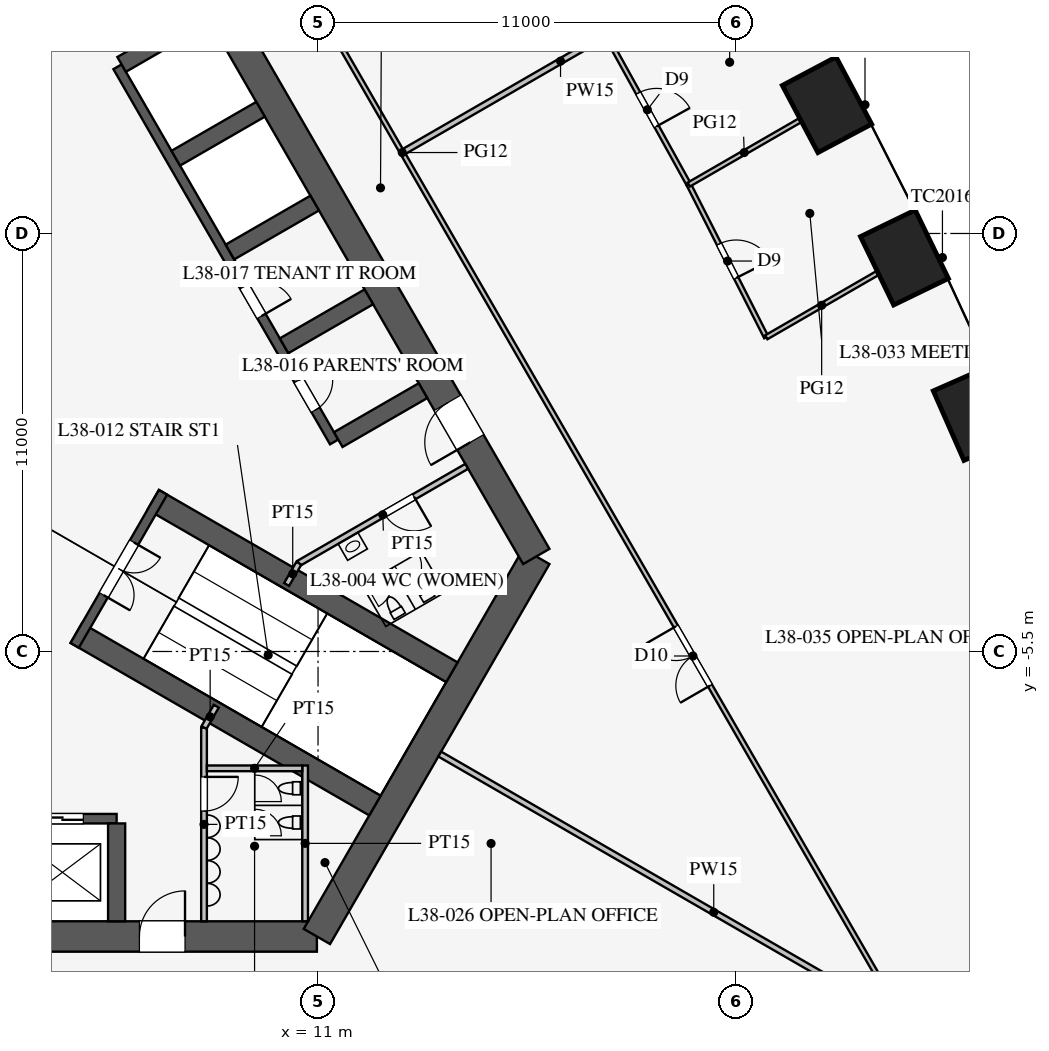
"""IFC4 building model, lengths in metres.
Left out: names, types, materials, properties, quantities, classifications, styles, units other than length and angle.
Written with IfcOpenShell. Run it as: python <this file> out.ifc"""

import sys

from ifc_helpers import new_model, si_unit, direction, frame, frame_2d, origin, origin_2d, place, context, subcontext, project, spatial, rectangle, extrude, element, fill, save


model = new_model("IFC4")
c1 = context("Model", 3, precision=1e-05, world=origin(), true_north=direction((0.0, 1.0)))
c2 = subcontext(c1, "Body", "Model", "MODEL_VIEW")
j1 = project(units=[si_unit("LENGTHUNIT", "METRE"), si_unit("PLANEANGLEUNIT", "RADIAN")], contexts=[c1])
p1 = place(None, origin())
s1 = spatial("IfcSite", under=j1, at=p1, CompositionType="ELEMENT")
p2 = place(p1, origin())
s2 = spatial("IfcBuilding", under=s1, at=p2, CompositionType="ELEMENT")
p3 = place(p2, frame((0.0, 0.0, 166.1)))
s3 = spatial("IfcBuildingStorey", under=s2, at=p3, CompositionType="ELEMENT", Elevation=166.1)
for number, where, z_axis, x_axis in (
    (1, (28.325, 0.765, 0.0), (0.0, 0.0, 1.0), (-0.403, 0.915, 0.0)),
    (2, (26.43, 4.867, 0.0), (0.0, 0.0, 1.0), (-0.436, 0.9, 0.0)),
    (3, (24.393, 8.887, 0.0), (0.0, 0.0, 1.0), (-0.468, 0.883, 0.0)),
):
    element("IfcColumn", number, at=place(p3, frame(where, z_axis=z_axis, x_axis=x_axis)), inside=s3, PredefinedType="COLUMN", context=c2, shape_type="SweptSolid", body=[
        extrude(rectangle(XDim=2.0, YDim=1.6, at=origin_2d()), origin(), (0.0, 0.0, 1.0), 4.2),
    ])
p4 = place(p3, frame((-10.97, -13.0, 0.0), z_axis=(0.0, 0.0, 1.0), x_axis=(1.0, 0.0, 0.0)))
e4 = element("IfcWall", 4, at=p4, inside=s3, PredefinedType="SHEAR", context=c2, shape_type="SweptSolid", body=[
    extrude(rectangle(XDim=21.939, YDim=0.8, at=frame_2d((10.97, 0.0))), origin(), (0.0, 0.0, 1.0), 4.2),
])
p5 = place(p4, frame((17.27, 0.0, 0.0)))
e5 = element("IfcOpeningElement", 5, at=p5, cuts=e4, PredefinedType="OPENING", context=c2, shape_type="SweptSolid", body=[
    extrude(rectangle(XDim=1.2, YDim=2.1, at=frame_2d((0.6, 1.05))), frame((0.0, 0.41, 0.0), z_axis=(0.0, -1.0, 0.0), x_axis=(1.0, 0.0, 0.0)), (0.0, 0.0, 1.0), 0.82),
])
p6 = place(p4, frame((3.47, 0.0, 0.0)))
e6 = element("IfcOpeningElement", 6, at=p6, cuts=e4, PredefinedType="OPENING", context=c2, shape_type="SweptSolid", body=[
    extrude(rectangle(XDim=1.2, YDim=2.1, at=frame_2d((0.6, 1.05))), frame((0.0, 0.41, 0.0), z_axis=(0.0, -1.0, 0.0), x_axis=(1.0, 0.0, 0.0)), (0.0, 0.0, 1.0), 0.82),
])
p7 = place(p3, frame((10.97, -13.0, 0.0), z_axis=(0.0, 0.0, 1.0), x_axis=(0.499995765644, 0.866027848477, 0.0)))
e7 = element("IfcWall", 7, at=p7, inside=s3, PredefinedType="SHEAR", context=c2, shape_type="SweptSolid", body=[
    extrude(rectangle(XDim=11.547, YDim=0.8, at=frame_2d((5.773, 0.0))), origin(), (0.0, 0.0, 1.0), 4.2),
])
p8 = place(p3, frame((16.743, -3.0, 0.0), z_axis=(0.0, 0.0, 1.0), x_axis=(-0.500002442456, 0.866023993627, 0.0)))
e8 = element("IfcWall", 8, at=p8, inside=s3, PredefinedType="SHEAR", context=c2, shape_type="SweptSolid", body=[
    extrude(rectangle(XDim=21.939, YDim=0.8, at=frame_2d((10.97, 0.0))), origin(), (0.0, 0.0, 1.0), 4.2),
])
p9 = place(p8, frame((17.27, 0.0, 0.0)))
e9 = element("IfcOpeningElement", 9, at=p9, cuts=e8, PredefinedType="OPENING", context=c2, shape_type="SweptSolid", body=[
    extrude(rectangle(XDim=1.2, YDim=2.1, at=frame_2d((0.6, 1.05))), frame((0.0, 0.41, 0.0), z_axis=(0.0, -1.0, 0.0), x_axis=(1.0, 0.0, 0.0)), (0.0, 0.0, 1.0), 0.82),
])
p10 = place(p8, frame((3.47, 0.0, 0.0)))
e10 = element("IfcOpeningElement", 10, at=p10, cuts=e8, PredefinedType="OPENING", context=c2, shape_type="SweptSolid", body=[
    extrude(rectangle(XDim=1.2, YDim=2.1, at=frame_2d((0.6, 1.05))), frame((0.0, 0.41, 0.0), z_axis=(0.0, -1.0, 0.0), x_axis=(1.0, 0.0, 0.0)), (0.0, 0.0, 1.0), 0.82),
])
p11 = place(p3, frame((-5.7, -9.9, 0.0), z_axis=(0.0, 0.0, 1.0), x_axis=(1.0, 0.0, 0.0)))
e11 = element("IfcWall", 11, at=p11, inside=s3, PredefinedType="SHEAR", context=c2, shape_type="SweptSolid", body=[
    extrude(rectangle(XDim=11.4, YDim=0.25, at=frame_2d((5.7, 0.0))), origin(), (0.0, 0.0, 1.0), 4.2),
])
p12 = place(p11, frame((0.875, 0.0, 0.0)))
e12 = element("IfcOpeningElement", 12, at=p12, cuts=e11, PredefinedType="OPENING", context=c2, shape_type="SweptSolid", body=[
    extrude(rectangle(XDim=1.1, YDim=2.2, at=frame_2d((0.55, 1.1))), frame((0.0, 0.135, 0.0), z_axis=(0.0, -1.0, 0.0), x_axis=(1.0, 0.0, 0.0)), (0.0, 0.0, 1.0), 0.27),
])
p13 = place(p11, frame((3.725, 0.0, 0.0)))
e13 = element("IfcOpeningElement", 13, at=p13, cuts=e11, PredefinedType="OPENING", context=c2, shape_type="SweptSolid", body=[
    extrude(rectangle(XDim=1.1, YDim=2.2, at=frame_2d((0.55, 1.1))), frame((0.0, 0.135, 0.0), z_axis=(0.0, -1.0, 0.0), x_axis=(1.0, 0.0, 0.0)), (0.0, 0.0, 1.0), 0.27),
])
p14 = place(p11, frame((6.575, 0.0, 0.0)))
e14 = element("IfcOpeningElement", 14, at=p14, cuts=e11, PredefinedType="OPENING", context=c2, shape_type="SweptSolid", body=[
    extrude(rectangle(XDim=1.1, YDim=2.2, at=frame_2d((0.55, 1.1))), frame((0.0, 0.135, 0.0), z_axis=(0.0, -1.0, 0.0), x_axis=(1.0, 0.0, 0.0)), (0.0, 0.0, 1.0), 0.27),
])
p15 = place(p11, frame((9.425, 0.0, 0.0)))
e15 = element("IfcOpeningElement", 15, at=p15, cuts=e11, PredefinedType="OPENING", context=c2, shape_type="SweptSolid", body=[
    extrude(rectangle(XDim=1.1, YDim=2.2, at=frame_2d((0.55, 1.1))), frame((0.0, 0.135, 0.0), z_axis=(0.0, -1.0, 0.0), x_axis=(1.0, 0.0, 0.0)), (0.0, 0.0, 1.0), 0.27),
])
p16 = place(p3, frame((5.7, -10.025, 0.0), z_axis=(0.0, 0.0, 1.0), x_axis=(0.0, -1.0, 0.0)))
e16 = element("IfcWall", 16, at=p16, inside=s3, PredefinedType="SHEAR", context=c2, shape_type="SweptSolid", body=[
    extrude(rectangle(XDim=2.575, YDim=0.45, at=frame_2d((1.288, 0.0))), origin(), (0.0, 0.0, 1.0), 4.2),
])
p17 = place(p3, frame((11.424, 0.014, 0.0), z_axis=(0.0, 0.0, 1.0), x_axis=(-0.500001763848, 0.866024385424, 0.0)))
e17 = element("IfcWall", 17, at=p17, inside=s3, PredefinedType="SHEAR", context=c2, shape_type="SweptSolid", body=[
    extrude(rectangle(XDim=11.4, YDim=0.25, at=frame_2d((5.7, 0.0))), origin(), (0.0, 0.0, 1.0), 4.2),
])
p18 = place(p17, frame((0.975, 0.0, 0.0)))
e18 = element("IfcOpeningElement", 18, at=p18, cuts=e17, PredefinedType="OPENING", context=c2, shape_type="SweptSolid", body=[
    extrude(rectangle(XDim=0.9, YDim=2.1, at=frame_2d((0.45, 1.05))), frame((0.0, 0.135, 0.0), z_axis=(0.0, -1.0, 0.0), x_axis=(1.0, 0.0, 0.0)), (0.0, 0.0, 1.0), 0.27),
])
p19 = place(p17, frame((3.825, 0.0, 0.0)))
e19 = element("IfcOpeningElement", 19, at=p19, cuts=e17, PredefinedType="OPENING", context=c2, shape_type="SweptSolid", body=[
    extrude(rectangle(XDim=0.9, YDim=2.1, at=frame_2d((0.45, 1.05))), frame((0.0, 0.135, 0.0), z_axis=(0.0, -1.0, 0.0), x_axis=(1.0, 0.0, 0.0)), (0.0, 0.0, 1.0), 0.27),
])
for number, where, z_axis, x_axis in (
    (20, (11.532, 0.076, 0.0), (0.0, 0.0, 1.0), (0.866, 0.5, 0.0)),
    (21, (10.107, 2.544, 0.0), (0.0, 0.0, 1.0), (0.866, 0.5, 0.0)),
    (22, (8.682, 5.012, 0.0), (0.0, 0.0, 1.0), (0.866, 0.5, 0.0)),
    (23, (7.257, 7.481, 0.0), (0.0, 0.0, 1.0), (0.866, 0.5, 0.0)),
):
    element("IfcWall", number, at=place(p3, frame(where, z_axis=z_axis, x_axis=x_axis)), inside=s3, PredefinedType="SHEAR", context=c2, shape_type="SweptSolid", body=[
        extrude(rectangle(XDim=2.575, YDim=0.45, at=frame_2d((1.288, 0.0))), origin(), (0.0, 0.0, 1.0), 4.2),
    ])
p20 = place(p3, frame((5.832, 9.949, 0.0), z_axis=(0.0, 0.0, 1.0), x_axis=(0.866029291668, 0.499993265928, 0.0)))
e24 = element("IfcWall", 24, at=p20, inside=s3, PredefinedType="SHEAR", context=c2, shape_type="SweptSolid", body=[
    extrude(rectangle(XDim=2.575, YDim=0.45, at=frame_2d((1.288, 0.0))), origin(), (0.0, 0.0, 1.0), 4.2),
])
for number, where, z_axis, x_axis in (
    (25, (4.638, -5.016, 0.0), (0.0, 0.0, 1.0), (0.866, -0.5, 0.0)),
    (26, (6.663, -1.509, 0.0), (0.0, 0.0, 1.0), (0.866, -0.5, 0.0)),
):
    element("IfcWall", number, at=place(p3, frame(where, z_axis=z_axis, x_axis=x_axis)), inside=s3, PredefinedType="SHEAR", context=c2, shape_type="SweptSolid", body=[
        extrude(rectangle(XDim=9.075, YDim=0.6, at=frame_2d((4.538, 0.0))), origin(), (0.0, 0.0, 1.0), 4.2),
    ])
p21 = place(p3, frame((4.597, -5.339, 0.0), z_axis=(0.0, 0.0, 1.0), x_axis=(0.499984536904, 0.866034331223, 0.0)))
e27 = element("IfcWall", 27, at=p21, inside=s3, PredefinedType="SHEAR", context=c2, shape_type="SweptSolid", body=[
    extrude(rectangle(XDim=4.65, YDim=0.25, at=frame_2d((2.325, 0.0))), origin(), (0.0, 0.0, 1.0), 4.2),
])
p22 = place(p21, frame((1.525, 0.0, 0.0)))
e28 = element("IfcOpeningElement", 28, at=p22, cuts=e27, PredefinedType="OPENING", context=c2, shape_type="SweptSolid", body=[
    extrude(rectangle(XDim=1.6, YDim=2.1, at=frame_2d((0.8, 1.05))), frame((0.0, 0.135, 0.0), z_axis=(0.0, -1.0, 0.0), x_axis=(1.0, 0.0, 0.0)), (0.0, 0.0, 1.0), 0.27),
])
p23 = place(p3, frame((8.0, -7.5, 0.0), z_axis=(0.0, 0.0, 1.0), x_axis=(0.0, -1.0, 0.0)))
e29 = element("IfcWall", 29, at=p23, inside=s3, PredefinedType="PARTITIONING", context=c2, shape_type="SweptSolid", body=[
    extrude(rectangle(XDim=5.1, YDim=0.15, at=frame_2d((2.55, 0.0))), origin(), (0.0, 0.0, 1.0), 4.0),
])
p24 = place(p23, frame((1.3, 0.0, 0.0)))
e30 = element("IfcOpeningElement", 30, at=p24, cuts=e29, PredefinedType="OPENING", context=c2, shape_type="SweptSolid", body=[
    extrude(rectangle(XDim=0.9, YDim=2.1, at=frame_2d((0.45, 1.05))), frame((0.0, 0.085, 0.0), z_axis=(0.0, -1.0, 0.0), x_axis=(1.0, 0.0, 0.0)), (0.0, 0.0, 1.0), 0.17),
])
p25 = place(p3, frame((10.495, -3.178, 0.0), z_axis=(0.0, 0.0, 1.0), x_axis=(0.86602216432, 0.500005610874, 0.0)))
e31 = element("IfcWall", 31, at=p25, inside=s3, PredefinedType="PARTITIONING", context=c2, shape_type="SweptSolid", body=[
    extrude(rectangle(XDim=5.1, YDim=0.15, at=frame_2d((2.55, 0.0))), origin(), (0.0, 0.0, 1.0), 4.0),
])
p26 = place(p25, frame((2.6, 0.0, 0.0)))
e32 = element("IfcOpeningElement", 32, at=p26, cuts=e31, PredefinedType="OPENING", context=c2, shape_type="SweptSolid", body=[
    extrude(rectangle(XDim=0.9, YDim=2.1, at=frame_2d((0.45, 1.05))), frame((0.0, 0.085, 0.0), z_axis=(0.0, -1.0, 0.0), x_axis=(1.0, 0.0, 0.0)), (0.0, 0.0, 1.0), 0.17),
])
for number, where, z_axis, x_axis in (
    (33, (8.0, -7.5, 0.0), (0.0, 0.0, 1.0), (0.5, 0.866, 0.0)),
    (34, (10.495, -3.178, 0.0), (0.0, 0.0, 1.0), (-0.5, -0.866, 0.0)),
):
    element("IfcWall", number, at=place(p3, frame(where, z_axis=z_axis, x_axis=x_axis)), inside=s3, PredefinedType="PARTITIONING", context=c2, shape_type="SweptSolid", body=[
        extrude(rectangle(XDim=0.645, YDim=0.15, at=frame_2d((0.323, 0.0))), origin(), (0.0, 0.0, 1.0), 4.0),
    ])
p27 = place(p3, frame((10.66, -8.5, 0.0), z_axis=(0.0, 0.0, 1.0), x_axis=(0.0, -1.0, 0.0)))
e35 = element("IfcWall", 35, at=p27, inside=s3, PredefinedType="PARTITIONING", context=c2, shape_type="SweptSolid", body=[
    extrude(rectangle(XDim=4.1, YDim=0.15, at=frame_2d((2.05, 0.0))), origin(), (0.0, 0.0, 1.0), 4.0),
])
p28 = place(p3, frame((8.075, -8.575, 0.0), z_axis=(0.0, 0.0, 1.0), x_axis=(1.0, 0.0, 0.0)))
e36 = element("IfcWall", 36, at=p28, inside=s3, PredefinedType="PARTITIONING", context=c2, shape_type="SweptSolid", body=[
    extrude(rectangle(XDim=2.51, YDim=0.15, at=frame_2d((1.255, 0.0))), origin(), (0.0, 0.0, 1.0), 4.0),
])
p29 = place(p3, frame((14.203, -8.2, 0.0), z_axis=(0.0, 0.0, 1.0), x_axis=(0.866024668836, -0.500001272966, 0.0)))
e37 = element("IfcWall", 37, at=p29, inside=s3, PredefinedType="PARTITIONING", context=c2, shape_type="SweptSolid", body=[
    extrude(rectangle(XDim=16.65, YDim=0.15, at=frame_2d((8.325, 0.0))), origin(), (0.0, 0.0, 1.0), 2.3),
])
p30 = place(p3, frame((13.268, 7.66, 0.0), z_axis=(0.0, 0.0, 1.0), x_axis=(0.866013963754, 0.500019814191, 0.0)))
e38 = element("IfcWall", 38, at=p30, inside=s3, PredefinedType="PARTITIONING", context=c2, shape_type="SweptSolid", body=[
    extrude(rectangle(XDim=9.5, YDim=0.15, at=frame_2d((4.75, 0.0))), origin(), (0.0, 0.0, 1.0), 2.8),
])
p31 = place(p3, frame((26.415, -15.231, 0.0), z_axis=(0.0, 0.0, 1.0), x_axis=(-0.50000091641, 0.866024874695, 0.0)))
e39 = element("IfcWall", 39, at=p31, inside=s3, PredefinedType="PARTITIONING", context=c2, shape_type="SweptSolid", body=[
    extrude(rectangle(XDim=52.796, YDim=0.12, at=frame_2d((26.398, 0.0))), origin(), (0.0, 0.0, 1.0), 2.9),
])
p32 = place(p31, frame((10.2, 0.0, 0.15)))
e40 = element("IfcOpeningElement", 40, at=p32, cuts=e39, PredefinedType="OPENING", context=c2, shape_type="SweptSolid", body=[
    extrude(rectangle(XDim=1.8, YDim=2.1, at=frame_2d((0.9, 1.05))), frame((0.0, 0.07, 0.0), z_axis=(0.0, -1.0, 0.0), x_axis=(1.0, 0.0, 0.0)), (0.0, 0.0, 1.0), 0.14),
])
p33 = place(p31, frame((40.8, 0.0, 0.15)))
e41 = element("IfcOpeningElement", 41, at=p33, cuts=e39, PredefinedType="OPENING", context=c2, shape_type="SweptSolid", body=[
    extrude(rectangle(XDim=1.8, YDim=2.1, at=frame_2d((0.9, 1.05))), frame((0.0, 0.07, 0.0), z_axis=(0.0, -1.0, 0.0), x_axis=(1.0, 0.0, 0.0)), (0.0, 0.0, 1.0), 0.14),
])
p34 = place(p3, frame((20.756, 6.787, 0.0), z_axis=(0.0, 0.0, 1.0), x_axis=(-0.484292898211, 0.874905931368, 0.0)))
e42 = element("IfcWall", 42, at=p34, inside=s3, PredefinedType="PARTITIONING", context=c2, shape_type="SweptSolid", body=[
    extrude(rectangle(XDim=4.501, YDim=0.12, at=frame_2d((2.25, 0.0))), origin(), (0.0, 0.0, 1.0), 2.9),
])
p35 = place(p34, frame((1.75, 0.0, 0.15)))
e43 = element("IfcOpeningElement", 43, at=p35, cuts=e42, PredefinedType="OPENING", context=c2, shape_type="SweptSolid", body=[
    extrude(rectangle(XDim=1.0, YDim=2.1, at=frame_2d((0.5, 1.05))), frame((0.0, 0.07, 0.0), z_axis=(0.0, -1.0, 0.0), x_axis=(1.0, 0.0, 0.0)), (0.0, 0.0, 1.0), 0.14),
])
p36 = place(p3, frame((22.795, 2.768, 0.0), z_axis=(0.0, 0.0, 1.0), x_axis=(-0.452471679136, 0.891778772779, 0.0)))
e44 = element("IfcWall", 44, at=p36, inside=s3, PredefinedType="PARTITIONING", context=c2, shape_type="SweptSolid", body=[
    extrude(rectangle(XDim=4.507, YDim=0.12, at=frame_2d((2.253, 0.0))), origin(), (0.0, 0.0, 1.0), 2.9),
])
p37 = place(p36, frame((1.75, 0.0, 0.15)))
e45 = element("IfcOpeningElement", 45, at=p37, cuts=e44, PredefinedType="OPENING", context=c2, shape_type="SweptSolid", body=[
    extrude(rectangle(XDim=1.0, YDim=2.1, at=frame_2d((0.5, 1.05))), frame((0.0, 0.07, 0.0), z_axis=(0.0, -1.0, 0.0), x_axis=(1.0, 0.0, 0.0)), (0.0, 0.0, 1.0), 0.14),
])
p38 = place(p3, frame((20.756, 6.787, 0.0), z_axis=(0.0, 0.0, 1.0), x_axis=(0.866022675988, 0.500004724652, 0.0)))
e46 = element("IfcWall", 46, at=p38, inside=s3, PredefinedType="PARTITIONING", context=c2, shape_type="SweptSolid", body=[
    extrude(rectangle(XDim=3.369, YDim=0.12, at=frame_2d((1.685, 0.0))), origin(), (0.0, 0.0, 1.0), 2.8),
])
p39 = place(p3, frame((22.795, 2.768, 0.0), z_axis=(0.0, 0.0, 1.0), x_axis=(0.866024928363, 0.500000823453, 0.0)))
e47 = element("IfcWall", 47, at=p39, inside=s3, PredefinedType="PARTITIONING", context=c2, shape_type="SweptSolid", body=[
    extrude(rectangle(XDim=3.366, YDim=0.12, at=frame_2d((1.683, 0.0))), origin(), (0.0, 0.0, 1.0), 2.9),
])
p40 = place(p24, origin())
e48 = element("IfcDoor", 48, at=p40, inside=s3, OperationType="SINGLE_SWING_LEFT", PredefinedType="DOOR", context=c2, shape_type="SweptSolid", body=[
    extrude(rectangle(XDim=0.9, YDim=2.1, at=frame_2d((0.45, 1.05))), frame((0.0, 0.025, 0.0), z_axis=(0.0, -1.0, 0.0), x_axis=(1.0, 0.0, 0.0)), (0.0, 0.0, 1.0), 0.05),
])
fill(e30, e48)
p41 = place(p26, frame((0.9, 0.0, 0.0), z_axis=(0.0, 0.0, 1.0), x_axis=(-1.0, 0.0, 0.0)))
e49 = element("IfcDoor", 49, at=p41, inside=s3, OperationType="SINGLE_SWING_LEFT", PredefinedType="DOOR", context=c2, shape_type="SweptSolid", body=[
    extrude(rectangle(XDim=0.9, YDim=2.1, at=frame_2d((0.45, 1.05))), frame((0.0, 0.025, 0.0), z_axis=(0.0, -1.0, 0.0), x_axis=(1.0, 0.0, 0.0)), (0.0, 0.0, 1.0), 0.05),
])
fill(e32, e49)
p42 = place(p22, frame((1.6, 0.0, 0.0), z_axis=(0.0, 0.0, 1.0), x_axis=(-1.0, 0.0, 0.0)))
e50 = element("IfcDoor", 50, at=p42, inside=s3, OperationType="DOUBLE_DOOR_SINGLE_SWING", PredefinedType="DOOR", context=c2, shape_type="SweptSolid", body=[
    extrude(rectangle(XDim=1.6, YDim=2.1, at=frame_2d((0.8, 1.05))), frame((0.0, 0.025, 0.0), z_axis=(0.0, -1.0, 0.0), x_axis=(1.0, 0.0, 0.0)), (0.0, 0.0, 1.0), 0.05),
])
fill(e28, e50)
p43 = place(p5, origin())
e51 = element("IfcDoor", 51, at=p43, inside=s3, OperationType="SINGLE_SWING_RIGHT", PredefinedType="DOOR", context=c2, shape_type="SweptSolid", body=[
    extrude(rectangle(XDim=1.2, YDim=2.1, at=frame_2d((0.6, 1.05))), frame((0.0, 0.025, 0.0), z_axis=(0.0, -1.0, 0.0), x_axis=(1.0, 0.0, 0.0)), (0.0, 0.0, 1.0), 0.05),
])
fill(e5, e51)
p44 = place(p10, origin())
e52 = element("IfcDoor", 52, at=p44, inside=s3, OperationType="SINGLE_SWING_LEFT", PredefinedType="DOOR", context=c2, shape_type="SweptSolid", body=[
    extrude(rectangle(XDim=1.2, YDim=2.1, at=frame_2d((0.6, 1.05))), frame((0.0, 0.025, 0.0), z_axis=(0.0, -1.0, 0.0), x_axis=(1.0, 0.0, 0.0)), (0.0, 0.0, 1.0), 0.05),
])
fill(e10, e52)
p45 = place(p18, frame((0.9, 0.0, 0.0), z_axis=(0.0, 0.0, 1.0), x_axis=(-1.0, 0.0, 0.0)))
e53 = element("IfcDoor", 53, at=p45, inside=s3, OperationType="SINGLE_SWING_LEFT", PredefinedType="DOOR", context=c2, shape_type="SweptSolid", body=[
    extrude(rectangle(XDim=0.9, YDim=2.1, at=frame_2d((0.45, 1.05))), frame((0.0, 0.025, 0.0), z_axis=(0.0, -1.0, 0.0), x_axis=(1.0, 0.0, 0.0)), (0.0, 0.0, 1.0), 0.05),
])
fill(e18, e53)
p46 = place(p19, frame((0.9, 0.0, 0.0), z_axis=(0.0, 0.0, 1.0), x_axis=(-1.0, 0.0, 0.0)))
e54 = element("IfcDoor", 54, at=p46, inside=s3, OperationType="SINGLE_SWING_RIGHT", PredefinedType="DOOR", context=c2, shape_type="SweptSolid", body=[
    extrude(rectangle(XDim=0.9, YDim=2.1, at=frame_2d((0.45, 1.05))), frame((0.0, 0.025, 0.0), z_axis=(0.0, -1.0, 0.0), x_axis=(1.0, 0.0, 0.0)), (0.0, 0.0, 1.0), 0.05),
])
fill(e19, e54)
p47 = place(p35, frame((1.0, 0.0, 0.0), z_axis=(0.0, 0.0, 1.0), x_axis=(-1.0, 0.0, 0.0)))
e55 = element("IfcDoor", 55, at=p47, inside=s3, OperationType="SINGLE_SWING_RIGHT", PredefinedType="DOOR", context=c2, shape_type="SweptSolid", body=[
    extrude(rectangle(XDim=1.0, YDim=2.1, at=frame_2d((0.5, 1.05))), frame((0.0, 0.025, 0.0), z_axis=(0.0, -1.0, 0.0), x_axis=(1.0, 0.0, 0.0)), (0.0, 0.0, 1.0), 0.05),
])
fill(e43, e55)
p48 = place(p37, frame((1.0, 0.0, 0.0), z_axis=(0.0, 0.0, 1.0), x_axis=(-1.0, 0.0, 0.0)))
e56 = element("IfcDoor", 56, at=p48, inside=s3, OperationType="SINGLE_SWING_RIGHT", PredefinedType="DOOR", context=c2, shape_type="SweptSolid", body=[
    extrude(rectangle(XDim=1.0, YDim=2.1, at=frame_2d((0.5, 1.05))), frame((0.0, 0.025, 0.0), z_axis=(0.0, -1.0, 0.0), x_axis=(1.0, 0.0, 0.0)), (0.0, 0.0, 1.0), 0.05),
])
fill(e45, e56)
p49 = place(p32, origin())
e57 = element("IfcDoor", 57, at=p49, inside=s3, OperationType="DOUBLE_DOOR_SINGLE_SWING", PredefinedType="DOOR", context=c2, shape_type="SweptSolid", body=[
    extrude(rectangle(XDim=1.8, YDim=2.1, at=frame_2d((0.9, 1.05))), frame((0.0, 0.025, 0.0), z_axis=(0.0, -1.0, 0.0), x_axis=(1.0, 0.0, 0.0)), (0.0, 0.0, 1.0), 0.05),
])
fill(e40, e57)
p50 = place(p15, origin())
e58 = element("IfcDoor", 58, at=p50, inside=s3, OperationType="DOUBLE_DOOR_SLIDING", PredefinedType="DOOR", context=c2, shape_type="SweptSolid", body=[
    extrude(rectangle(XDim=1.1, YDim=2.2, at=frame_2d((0.55, 1.1))), frame((0.0, 0.025, 0.0), z_axis=(0.0, -1.0, 0.0), x_axis=(1.0, 0.0, 0.0)), (0.0, 0.0, 1.0), 0.05),
])
fill(e15, e58)
save(model, sys.argv[1])
